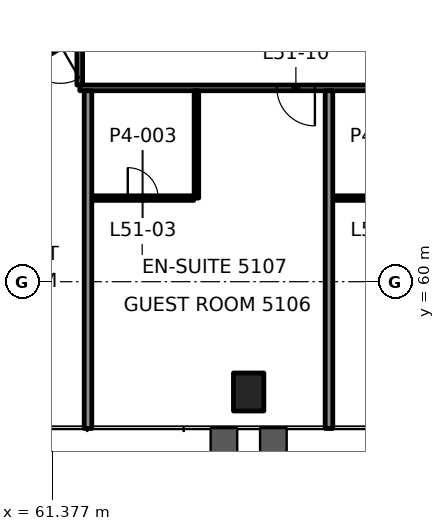
"""IFC4 building model, lengths in metres.
Left out: names, types, materials, properties, quantities, classifications, styles, units other than length and angle.
Written with IfcOpenShell. Run it as: python <this file> out.ifc"""

import sys

from ifc_helpers import new_model, si_unit, direction, frame, frame_2d, origin, origin_2d, place, context, subcontext, project, spatial, rectangle, hollow_rectangle, extrude, element, fill, save


model = new_model("IFC4")
c1 = context("Model", 3, precision=1e-05, world=origin(), true_north=direction((0.0, 1.0)))
c2 = subcontext(c1, "Body", "Model", "MODEL_VIEW")
j1 = project(units=[si_unit("LENGTHUNIT", "METRE"), si_unit("PLANEANGLEUNIT", "RADIAN")], contexts=[c1])
p1 = place(None, origin())
s1 = spatial("IfcSite", under=j1, at=p1, CompositionType="ELEMENT")
p2 = place(p1, origin())
s2 = spatial("IfcBuilding", under=s1, at=p2, CompositionType="ELEMENT")
p3 = place(p2, frame((0.0, 0.0, 218.2)))
s3 = spatial("IfcBuildingStorey", under=s2, at=p3, CompositionType="ELEMENT", Elevation=218.2)
p4 = place(p3, frame((66.544, 57.097, -0.0), z_axis=(0.0, 0.0, 1.0), x_axis=(1.0, 0.0, 0.0)))
e1 = element("IfcColumn", 1, at=p4, inside=s3, PredefinedType="COLUMN", context=c2, shape_type="SweptSolid", body=[
    extrude(hollow_rectangle(XDim=0.8, YDim=1.0, WallThickness=0.05, at=origin_2d()), origin(), (0.0, 0.0, 1.0), 3.9),
])
p5 = place(p3, frame((62.427, 62.2, 0.0), z_axis=(0.0, 0.0, 1.0), x_axis=(1.0, 0.0, 0.0)))
e2 = element("IfcWall", 2, at=p5, inside=s3, PredefinedType="PARTITIONING", context=c2, shape_type="SweptSolid", body=[
    extrude(rectangle(XDim=2.674, YDim=0.12, at=frame_2d((1.337, 0.0))), origin(), (0.0, 0.0, 1.0), 3.1),
])
p6 = place(p5, frame((0.937, 0.0, 0.0)))
e3 = element("IfcOpeningElement", 3, at=p6, cuts=e2, PredefinedType="OPENING", context=c2, shape_type="SweptSolid", body=[
    extrude(rectangle(XDim=0.8, YDim=2.1, at=frame_2d((0.4, 1.05))), frame((0.0, 0.07, 0.0), z_axis=(0.0, -1.0, 0.0), x_axis=(1.0, 0.0, 0.0)), (0.0, 0.0, 1.0), 0.14),
])
p7 = place(p3, frame((68.758, 62.2, 0.0), z_axis=(0.0, 0.0, 1.0), x_axis=(1.0, 0.0, 0.0)))
e4 = element("IfcWall", 4, at=p7, inside=s3, PredefinedType="PARTITIONING", context=c2, shape_type="SweptSolid", body=[
    extrude(rectangle(XDim=2.684, YDim=0.12, at=frame_2d((1.342, 0.0))), origin(), (0.0, 0.0, 1.0), 3.1),
])
p8 = place(p7, frame((0.942, 0.0, 0.0)))
e5 = element("IfcOpeningElement", 5, at=p8, cuts=e4, PredefinedType="OPENING", context=c2, shape_type="SweptSolid", body=[
    extrude(rectangle(XDim=0.8, YDim=2.1, at=frame_2d((0.4, 1.05))), frame((0.0, 0.07, 0.0), z_axis=(0.0, -1.0, 0.0), x_axis=(1.0, 0.0, 0.0)), (0.0, 0.0, 1.0), 0.14),
])
p9 = place(p3, frame((87.899, 65.1, 0.0), z_axis=(0.0, 0.0, 1.0), x_axis=(-1.0, 0.0, 0.0)))
e6 = element("IfcWall", 6, at=p9, inside=s3, PredefinedType="PARTITIONING", context=c2, shape_type="SweptSolid", body=[
    extrude(rectangle(XDim=25.799, YDim=0.15, at=frame_2d((12.899, 0.0))), origin(), (0.0, 0.0, 1.0), 3.1),
])
p10 = place(p9, frame((0.259, 0.0, 0.0)))
e7 = element("IfcOpeningElement", 7, at=p10, cuts=e6, PredefinedType="OPENING", context=c2, shape_type="SweptSolid", body=[
    extrude(rectangle(XDim=1.0, YDim=2.1, at=frame_2d((0.5, 1.05))), frame((0.0, 0.085, 0.0), z_axis=(0.0, -1.0, 0.0), x_axis=(1.0, 0.0, 0.0)), (0.0, 0.0, 1.0), 0.17),
])
p11 = place(p9, frame((4.641, 0.0, 0.0)))
e8 = element("IfcOpeningElement", 8, at=p11, cuts=e6, PredefinedType="OPENING", context=c2, shape_type="SweptSolid", body=[
    extrude(rectangle(XDim=1.0, YDim=2.1, at=frame_2d((0.5, 1.05))), frame((0.0, 0.085, 0.0), z_axis=(0.0, -1.0, 0.0), x_axis=(1.0, 0.0, 0.0)), (0.0, 0.0, 1.0), 0.17),
])
p12 = place(p9, frame((8.868, 0.0, 0.0)))
e9 = element("IfcOpeningElement", 9, at=p12, cuts=e6, PredefinedType="OPENING", context=c2, shape_type="SweptSolid", body=[
    extrude(rectangle(XDim=1.0, YDim=2.1, at=frame_2d((0.5, 1.05))), frame((0.0, 0.085, 0.0), z_axis=(0.0, -1.0, 0.0), x_axis=(1.0, 0.0, 0.0)), (0.0, 0.0, 1.0), 0.17),
])
p13 = place(p9, frame((13.271, 0.0, 0.0)))
e10 = element("IfcOpeningElement", 10, at=p13, cuts=e6, PredefinedType="OPENING", context=c2, shape_type="SweptSolid", body=[
    extrude(rectangle(XDim=1.0, YDim=2.1, at=frame_2d((0.5, 1.05))), frame((0.0, 0.085, 0.0), z_axis=(0.0, -1.0, 0.0), x_axis=(1.0, 0.0, 0.0)), (0.0, 0.0, 1.0), 0.17),
])
p14 = place(p9, frame((19.612, 0.0, 0.0)))
e11 = element("IfcOpeningElement", 11, at=p14, cuts=e6, PredefinedType="OPENING", context=c2, shape_type="SweptSolid", body=[
    extrude(rectangle(XDim=1.0, YDim=2.1, at=frame_2d((0.5, 1.05))), frame((0.0, 0.085, 0.0), z_axis=(0.0, -1.0, 0.0), x_axis=(1.0, 0.0, 0.0)), (0.0, 0.0, 1.0), 0.17),
])
p15 = place(p3, frame((62.1, 66.513, 0.0), z_axis=(0.0, 0.0, 1.0), x_axis=(-0.866025886419, -0.499999164051, 0.0)))
e12 = element("IfcWall", 12, at=p15, inside=s3, PredefinedType="PARTITIONING", context=c2, shape_type="SweptSolid", body=[
    extrude(rectangle(XDim=12.754, YDim=0.15, at=frame_2d((6.377, 0.0))), origin(), (0.0, 0.0, 1.0), 2.947),
])
p16 = place(p15, frame((0.587, 0.0, 0.0)))
e13 = element("IfcOpeningElement", 13, at=p16, cuts=e12, PredefinedType="OPENING", context=c2, shape_type="SweptSolid", body=[
    extrude(rectangle(XDim=1.0, YDim=2.1, at=frame_2d((0.5, 1.05))), frame((0.0, 0.085, 0.0), z_axis=(0.0, -1.0, 0.0), x_axis=(1.0, 0.0, 0.0)), (0.0, 0.0, 1.0), 0.17),
])
p17 = place(p15, frame((7.742, 0.0, 0.0)))
e14 = element("IfcOpeningElement", 14, at=p17, cuts=e12, PredefinedType="OPENING", context=c2, shape_type="SweptSolid", body=[
    extrude(rectangle(XDim=1.0, YDim=2.1, at=frame_2d((0.5, 1.05))), frame((0.0, 0.085, 0.0), z_axis=(0.0, -1.0, 0.0), x_axis=(1.0, 0.0, 0.0)), (0.0, 0.0, 1.0), 0.17),
])
p18 = place(p3, frame((50.155, 61.695, 0.0), z_axis=(0.0, 0.0, 1.0), x_axis=(0.8660236305, 0.500003071406, 0.0)))
e15 = element("IfcWall", 15, at=p18, inside=s3, PredefinedType="PARTITIONING", context=c2, shape_type="SweptSolid", body=[
    extrude(rectangle(XDim=13.707, YDim=0.15, at=frame_2d((6.853, 0.0))), origin(), (0.0, 0.0, 1.0), 3.1),
])
p19 = place(p18, frame((1.736, 0.0, 0.0)))
e16 = element("IfcOpeningElement", 16, at=p19, cuts=e15, PredefinedType="OPENING", context=c2, shape_type="SweptSolid", body=[
    extrude(rectangle(XDim=1.0, YDim=2.1, at=frame_2d((0.5, 1.05))), frame((0.0, 0.085, 0.0), z_axis=(0.0, -1.0, 0.0), x_axis=(1.0, 0.0, 0.0)), (0.0, 0.0, 1.0), 0.17),
])
p20 = place(p18, frame((11.777, 0.0, 0.0)))
e17 = element("IfcOpeningElement", 17, at=p20, cuts=e15, PredefinedType="OPENING", context=c2, shape_type="SweptSolid", body=[
    extrude(rectangle(XDim=1.0, YDim=2.1, at=frame_2d((0.5, 1.05))), frame((0.0, 0.085, 0.0), z_axis=(0.0, -1.0, 0.0), x_axis=(1.0, 0.0, 0.0)), (0.0, 0.0, 1.0), 0.17),
])
p21 = place(p3, frame((68.658, 56.137, 0.0), z_axis=(0.0, 0.0, 1.0), x_axis=(0.0, 1.0, 0.0)))
e18 = element("IfcWall", 18, at=p21, inside=s3, PredefinedType="PARTITIONING", context=c2, shape_type="SweptSolid", body=[
    extrude(rectangle(XDim=8.887, YDim=0.2, at=frame_2d((4.444, 0.0))), origin(), (0.0, 0.0, 1.0), 3.022),
])
p22 = place(p3, frame((65.17, 62.2, 0.0), z_axis=(0.0, 0.0, 1.0), x_axis=(0.0, 1.0, 0.0)))
e19 = element("IfcWall", 19, at=p22, inside=s3, PredefinedType="PARTITIONING", context=c2, shape_type="SweptSolid", body=[
    extrude(rectangle(XDim=2.825, YDim=0.12, at=frame_2d((1.413, 0.0))), origin(), (0.0, 0.0, 1.0), 3.1),
])
p23 = place(p3, frame((62.317, 56.137, 0.0), z_axis=(0.0, 0.0, 1.0), x_axis=(0.0, 1.0, 0.0)))
e20 = element("IfcWall", 20, at=p23, inside=s3, PredefinedType="PARTITIONING", context=c2, shape_type="SweptSolid", body=[
    extrude(rectangle(XDim=8.887, YDim=0.2, at=frame_2d((4.444, 0.0))), origin(), (0.0, 0.0, 1.0), 3.022),
])
p24 = place(p3, frame((62.1, 65.176, 0.0), z_axis=(0.0, 0.0, 1.0), x_axis=(0.0, 1.0, 0.0)))
e21 = element("IfcWall", 21, at=p24, inside=s3, PredefinedType="PARTITIONING", context=c2, shape_type="SweptSolid", body=[
    extrude(rectangle(XDim=1.201, YDim=0.15, at=frame_2d((0.6, 0.0))), origin(), (0.0, 0.0, 1.0), 2.947),
])
p25 = place(p6, origin())
e22 = element("IfcDoor", 22, at=p25, inside=s3, OperationType="SINGLE_SWING_RIGHT", PredefinedType="DOOR", context=c2, shape_type="SweptSolid", body=[
    extrude(rectangle(XDim=0.8, YDim=2.1, at=frame_2d((0.4, 1.05))), frame((0.0, 0.025, 0.0), z_axis=(0.0, -1.0, 0.0), x_axis=(1.0, 0.0, 0.0)), (0.0, 0.0, 1.0), 0.05),
])
fill(e3, e22)
p26 = place(p14, origin())
e23 = element("IfcDoor", 23, at=p26, inside=s3, OperationType="SINGLE_SWING_RIGHT", PredefinedType="DOOR", context=c2, shape_type="SweptSolid", body=[
    extrude(rectangle(XDim=1.0, YDim=2.1, at=frame_2d((0.5, 1.05))), frame((0.0, 0.025, 0.0), z_axis=(0.0, -1.0, 0.0), x_axis=(1.0, 0.0, 0.0)), (0.0, 0.0, 1.0), 0.05),
])
fill(e11, e23)
p27 = place(p16, origin())
e24 = element("IfcDoor", 24, at=p27, inside=s3, OperationType="SINGLE_SWING_RIGHT", PredefinedType="DOOR", context=c2, shape_type="SweptSolid", body=[
    extrude(rectangle(XDim=1.0, YDim=2.1, at=frame_2d((0.5, 1.05))), frame((0.0, 0.025, 0.0), z_axis=(0.0, -1.0, 0.0), x_axis=(1.0, 0.0, 0.0)), (0.0, 0.0, 1.0), 0.05),
])
fill(e13, e24)
save(model, sys.argv[1])
